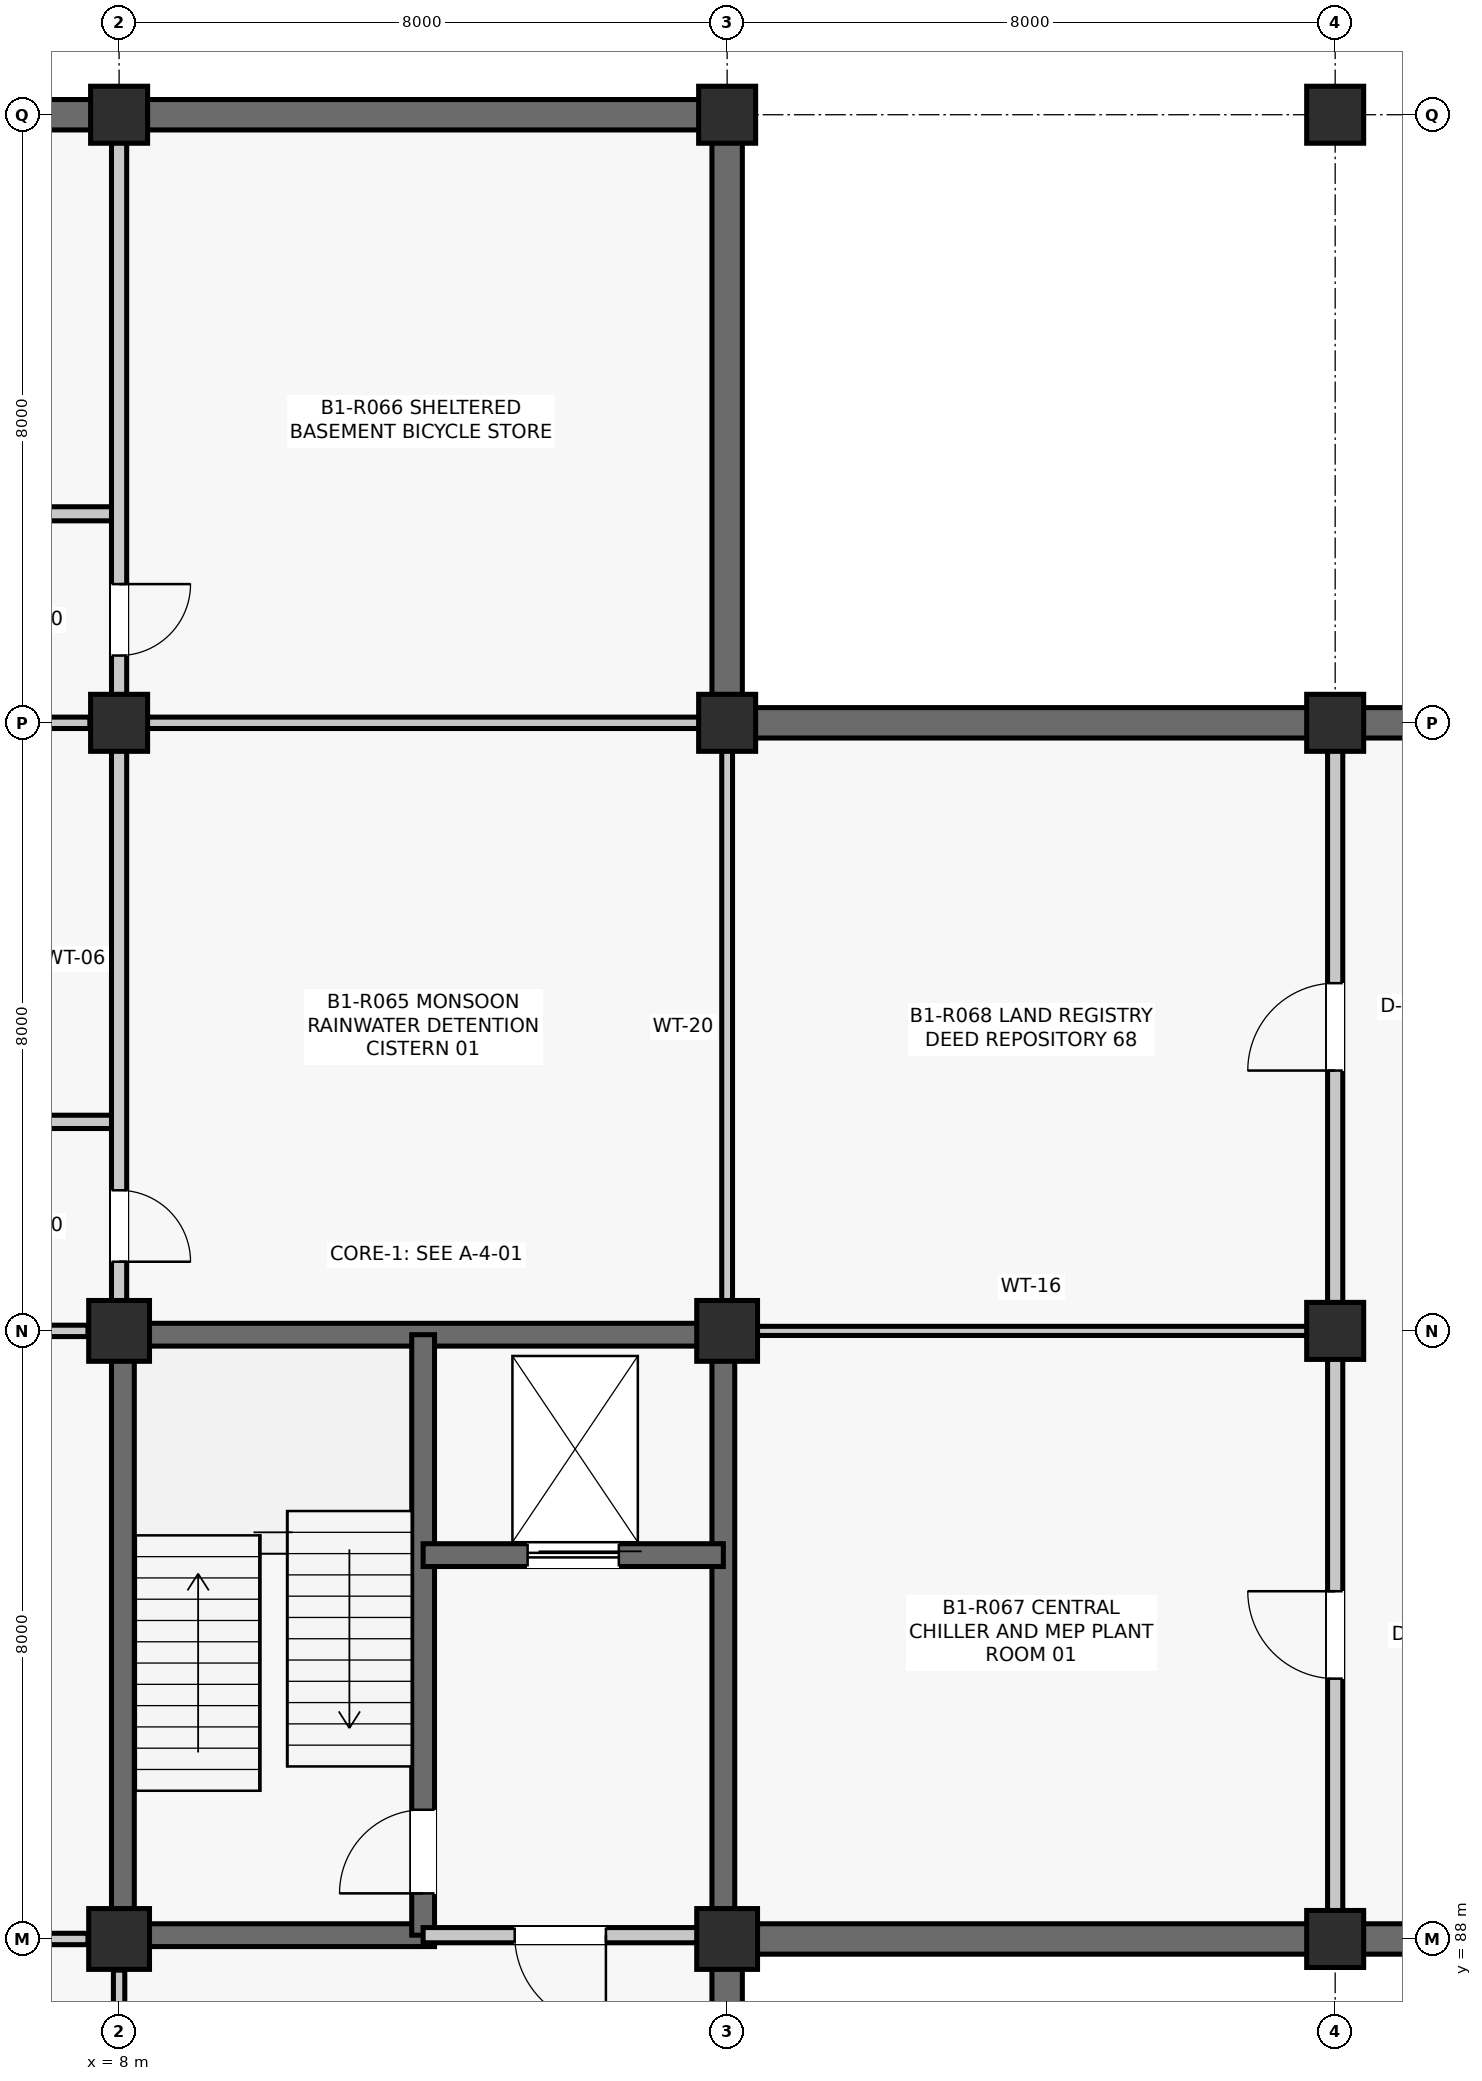
"""IFC4 building model, lengths in metres.
Left out: names, types, materials, properties, quantities, classifications, styles, units other than length and angle.
Written with IfcOpenShell. Run it as: python <this file> out.ifc"""

import sys

from ifc_helpers import new_model, si_unit, direction, frame, frame_2d, origin, origin_2d, place, context, subcontext, project, spatial, rectangle, extrude, element, fill, save


model = new_model("IFC4")
c1 = context("Model", 3, precision=1e-05, world=origin(), true_north=direction((0.0, 1.0)))
c2 = subcontext(c1, "Body", "Model", "MODEL_VIEW")
j1 = project(units=[si_unit("LENGTHUNIT", "METRE"), si_unit("PLANEANGLEUNIT", "RADIAN")], contexts=[c1])
p1 = place(None, origin())
s1 = spatial("IfcSite", under=j1, at=p1, CompositionType="ELEMENT")
p2 = place(p1, origin())
s2 = spatial("IfcBuilding", under=s1, at=p2, CompositionType="ELEMENT")
p3 = place(p2, frame((0.0, 0.0, -4.29)))
s3 = spatial("IfcBuildingStorey", under=s2, at=p3, CompositionType="ELEMENT", Elevation=-4.29)
for number, where, z_axis, x_axis in (
    (1, (8.0, 88.0, 0.0), (0.0, 0.0, 1.0), (1.0, 0.0, 0.0)),
    (2, (8.0, 96.0, 0.0), (0.0, 0.0, 1.0), (1.0, 0.0, 0.0)),
):
    element("IfcColumn", number, at=place(p3, frame(where, z_axis=z_axis, x_axis=x_axis)), inside=s3, PredefinedType="COLUMN", context=c2, shape_type="SweptSolid", body=[
        extrude(rectangle(XDim=0.8, YDim=0.8, at=origin_2d()), origin(), (0.0, 0.0, 1.0), 4.29),
    ])
for number, where, z_axis, x_axis in (
    (3, (8.0, 104.0, 0.0), (0.0, 0.0, 1.0), (1.0, 0.0, 0.0)),
    (4, (8.0, 112.0, 0.0), (0.0, 0.0, 1.0), (1.0, 0.0, 0.0)),
):
    element("IfcColumn", number, at=place(p3, frame(where, z_axis=z_axis, x_axis=x_axis)), inside=s3, PredefinedType="COLUMN", context=c2, shape_type="SweptSolid", body=[
        extrude(rectangle(XDim=0.75, YDim=0.75, at=origin_2d()), origin(), (0.0, 0.0, 1.0), 4.29),
    ])
for number, where, z_axis, x_axis in (
    (5, (16.0, 88.0, 0.0), (0.0, 0.0, 1.0), (1.0, 0.0, 0.0)),
    (6, (16.0, 96.0, 0.0), (0.0, 0.0, 1.0), (1.0, 0.0, 0.0)),
):
    element("IfcColumn", number, at=place(p3, frame(where, z_axis=z_axis, x_axis=x_axis)), inside=s3, PredefinedType="COLUMN", context=c2, shape_type="SweptSolid", body=[
        extrude(rectangle(XDim=0.8, YDim=0.8, at=origin_2d()), origin(), (0.0, 0.0, 1.0), 4.29),
    ])
for number, where, z_axis, x_axis in (
    (7, (16.0, 104.0, 0.0), (0.0, 0.0, 1.0), (1.0, 0.0, 0.0)),
    (8, (16.0, 112.0, 0.0), (0.0, 0.0, 1.0), (1.0, 0.0, 0.0)),
    (9, (24.0, 88.0, 0.0), (0.0, 0.0, 1.0), (1.0, 0.0, 0.0)),
    (10, (24.0, 96.0, 0.0), (0.0, 0.0, 1.0), (1.0, 0.0, 0.0)),
    (11, (24.0, 104.0, 0.0), (0.0, 0.0, 1.0), (1.0, 0.0, 0.0)),
    (12, (24.0, 112.0, 0.0), (0.0, 0.0, 1.0), (1.0, 0.0, 0.0)),
):
    element("IfcColumn", number, at=place(p3, frame(where, z_axis=z_axis, x_axis=x_axis)), inside=s3, PredefinedType="COLUMN", context=c2, shape_type="SweptSolid", body=[
        extrude(rectangle(XDim=0.75, YDim=0.75, at=origin_2d()), origin(), (0.0, 0.0, 1.0), 4.29),
    ])
p4 = place(p3, frame((0.36, 112.0, 0.0), z_axis=(0.0, 0.0, 1.0), x_axis=(1.0, 0.0, 0.0)))
e13 = element("IfcWall", 13, at=p4, inside=s3, PredefinedType="SHEAR", context=c2, shape_type="SweptSolid", body=[
    extrude(rectangle(XDim=7.28, YDim=0.4, at=frame_2d((3.64, 0.0))), origin(), (0.0, 0.0, 1.0), 3.654),
])
p5 = place(p3, frame((16.0, 80.335, 0.0), z_axis=(0.0, 0.0, 1.0), x_axis=(0.0, 1.0, 0.0)))
e14 = element("IfcWall", 14, at=p5, inside=s3, PredefinedType="SHEAR", context=c2, shape_type="SweptSolid", body=[
    extrude(rectangle(XDim=7.28, YDim=0.4, at=frame_2d((3.64, 0.0))), origin(), (0.0, 0.0, 1.0), 3.667),
])
p6 = place(p3, frame((8.36, 112.0, 0.0), z_axis=(0.0, 0.0, 1.0), x_axis=(1.0, 0.0, 0.0)))
e15 = element("IfcWall", 15, at=p6, inside=s3, PredefinedType="SHEAR", context=c2, shape_type="SweptSolid", body=[
    extrude(rectangle(XDim=7.28, YDim=0.4, at=frame_2d((3.64, 0.0))), origin(), (0.0, 0.0, 1.0), 3.594),
])
p7 = place(p3, frame((16.0, 104.36, 0.0), z_axis=(0.0, 0.0, 1.0), x_axis=(0.0, 1.0, 0.0)))
e16 = element("IfcWall", 16, at=p7, inside=s3, PredefinedType="SHEAR", context=c2, shape_type="SweptSolid", body=[
    extrude(rectangle(XDim=7.28, YDim=0.4, at=frame_2d((3.64, 0.0))), origin(), (0.0, 0.0, 1.0), 3.458),
])
p8 = place(p3, frame((16.385, 88.0, 0.0), z_axis=(0.0, 0.0, 1.0), x_axis=(1.0, 0.0, 0.0)))
e17 = element("IfcWall", 17, at=p8, inside=s3, PredefinedType="SHEAR", context=c2, shape_type="SweptSolid", body=[
    extrude(rectangle(XDim=7.255, YDim=0.4, at=frame_2d((3.627, 0.0))), origin(), (0.0, 0.0, 1.0), 3.59),
])
p9 = place(p3, frame((16.36, 104.0, 0.0), z_axis=(0.0, 0.0, 1.0), x_axis=(1.0, 0.0, 0.0)))
e18 = element("IfcWall", 18, at=p9, inside=s3, PredefinedType="SHEAR", context=c2, shape_type="SweptSolid", body=[
    extrude(rectangle(XDim=7.28, YDim=0.4, at=frame_2d((3.64, 0.0))), origin(), (0.0, 0.0, 1.0), 3.391),
])
p10 = place(p3, frame((24.36, 88.0, 0.0), z_axis=(0.0, 0.0, 1.0), x_axis=(1.0, 0.0, 0.0)))
e19 = element("IfcWall", 19, at=p10, inside=s3, PredefinedType="SHEAR", context=c2, shape_type="SweptSolid", body=[
    extrude(rectangle(XDim=7.28, YDim=0.4, at=frame_2d((3.64, 0.0))), origin(), (0.0, 0.0, 1.0), 3.654),
])
p11 = place(p3, frame((24.36, 104.0, 0.0), z_axis=(0.0, 0.0, 1.0), x_axis=(1.0, 0.0, 0.0)))
e20 = element("IfcWall", 20, at=p11, inside=s3, PredefinedType="SHEAR", context=c2, shape_type="SweptSolid", body=[
    extrude(rectangle(XDim=7.255, YDim=0.4, at=frame_2d((3.627, 0.0))), origin(), (0.0, 0.0, 1.0), 3.314),
])
for number, where, z_axis, x_axis in (
    (21, (8.05, 88.29, 0.0), (0.0, 0.0, 1.0), (0.0, 1.0, 0.0)),
    (22, (8.29, 95.95, 0.0), (0.0, 0.0, 1.0), (1.0, 0.0, 0.0)),
    (23, (15.95, 88.29, 0.0), (0.0, 0.0, 1.0), (0.0, 1.0, 0.0)),
):
    element("IfcWall", number, at=place(p3, frame(where, z_axis=z_axis, x_axis=x_axis)), inside=s3, PredefinedType="SHEAR", context=c2, shape_type="SweptSolid", body=[
        extrude(rectangle(XDim=7.42, YDim=0.3, at=frame_2d((3.71, 0.0))), origin(), (0.0, 0.0, 1.0), 4.015),
    ])
p12 = place(p3, frame((8.29, 88.05, 0.0), z_axis=(0.0, 0.0, 1.0), x_axis=(1.0, 0.0, 0.0)))
e24 = element("IfcWall", 24, at=p12, inside=s3, PredefinedType="SHEAR", context=c2, shape_type="SweptSolid", body=[
    extrude(rectangle(XDim=3.86, YDim=0.3, at=frame_2d((1.93, 0.0))), origin(), (0.0, 0.0, 1.0), 4.015),
])
p13 = place(p3, frame((12.0, 88.05, 0.0), z_axis=(0.0, 0.0, 1.0), x_axis=(0.0, 1.0, 0.0)))
e25 = element("IfcWall", 25, at=p13, inside=s3, PredefinedType="SHEAR", context=c2, shape_type="SweptSolid", body=[
    extrude(rectangle(XDim=7.9, YDim=0.3, at=frame_2d((3.95, 0.0))), origin(), (0.0, 0.0, 1.0), 4.015),
])
p14 = place(p13, frame((0.55, 0.0, 0.0)))
e26 = element("IfcOpeningElement", 26, at=p14, cuts=e25, PredefinedType="OPENING", context=c2, shape_type="SweptSolid", body=[
    extrude(rectangle(XDim=1.1, YDim=2.15, at=frame_2d((0.55, 1.075))), frame((0.0, 0.16, 0.0), z_axis=(0.0, -1.0, 0.0), x_axis=(1.0, 0.0, 0.0)), (0.0, 0.0, 1.0), 0.32),
])
p15 = place(p3, frame((12.0, 93.05, 0.0), z_axis=(0.0, 0.0, 1.0), x_axis=(1.0, 0.0, 0.0)))
e27 = element("IfcWall", 27, at=p15, inside=s3, PredefinedType="SHEAR", context=c2, shape_type="SweptSolid", body=[
    extrude(rectangle(XDim=3.95, YDim=0.3, at=frame_2d((1.975, 0.0))), origin(), (0.0, 0.0, 1.0), 4.015),
])
p16 = place(p15, frame((1.375, 0.0, 0.0)))
e28 = element("IfcOpeningElement", 28, at=p16, cuts=e27, PredefinedType="OPENING", context=c2, shape_type="SweptSolid", body=[
    extrude(rectangle(XDim=1.2, YDim=2.2, at=frame_2d((0.6, 1.1))), frame((0.0, 0.16, 0.0), z_axis=(0.0, -1.0, 0.0), x_axis=(1.0, 0.0, 0.0)), (0.0, 0.0, 1.0), 0.32),
])
p17 = place(p3, frame((12.0, 88.05, 0.0), z_axis=(0.0, 0.0, 1.0), x_axis=(1.0, 0.0, 0.0)))
e29 = element("IfcWall", 29, at=p17, inside=s3, PredefinedType="PARTITIONING", context=c2, shape_type="SweptSolid", body=[
    extrude(rectangle(XDim=3.61, YDim=0.2, at=frame_2d((1.805, 0.0))), origin(), (0.0, 0.0, 1.0), 3.307),
])
p18 = place(p17, frame((1.205, 0.0, 0.0)))
e30 = element("IfcOpeningElement", 30, at=p18, cuts=e29, PredefinedType="OPENING", context=c2, shape_type="SweptSolid", body=[
    extrude(rectangle(XDim=1.2, YDim=2.15, at=frame_2d((0.6, 1.075))), frame((0.0, 0.11, 0.0), z_axis=(0.0, -1.0, 0.0), x_axis=(1.0, 0.0, 0.0)), (0.0, 0.0, 1.0), 0.22),
])
p19 = place(p3, frame((2.75, 88.0, 0.0), z_axis=(0.0, 0.0, 1.0), x_axis=(1.0, 0.0, 0.0)))
e31 = element("IfcWall", 31, at=p19, inside=s3, PredefinedType="PARTITIONING", context=c2, shape_type="SweptSolid", body=[
    extrude(rectangle(XDim=4.84, YDim=0.15, at=frame_2d((2.42, 0.0))), origin(), (0.0, 0.0, 1.0), 3.384),
])
p20 = place(p3, frame((8.0, 82.75, 0.0), z_axis=(0.0, 0.0, 1.0), x_axis=(0.0, 1.0, 0.0)))
e32 = element("IfcWall", 32, at=p20, inside=s3, PredefinedType="PARTITIONING", context=c2, shape_type="SweptSolid", body=[
    extrude(rectangle(XDim=4.84, YDim=0.15, at=frame_2d((2.42, 0.0))), origin(), (0.0, 0.0, 1.0), 3.461),
])
p21 = place(p3, frame((2.75, 96.0, 0.0), z_axis=(0.0, 0.0, 1.0), x_axis=(1.0, 0.0, 0.0)))
e33 = element("IfcWall", 33, at=p21, inside=s3, PredefinedType="PARTITIONING", context=c2, shape_type="SweptSolid", body=[
    extrude(rectangle(XDim=4.84, YDim=0.15, at=frame_2d((2.42, 0.0))), origin(), (0.0, 0.0, 1.0), 3.307),
])
p22 = place(p3, frame((2.7, 98.75, 0.0), z_axis=(0.0, 0.0, 1.0), x_axis=(1.0, 0.0, 0.0)))
e34 = element("IfcWall", 34, at=p22, inside=s3, PredefinedType="PARTITIONING", context=c2, shape_type="SweptSolid", body=[
    extrude(rectangle(XDim=5.28, YDim=0.175, at=frame_2d((2.64, 0.0))), origin(), (0.0, 0.0, 1.0), 3.392),
])
p23 = place(p22, frame((2.13, 0.0, 0.0)))
e35 = element("IfcOpeningElement", 35, at=p23, cuts=e34, PredefinedType="OPENING", context=c2, shape_type="SweptSolid", body=[
    extrude(rectangle(XDim=1.02, YDim=2.2, at=frame_2d((0.51, 1.1))), frame((0.0, 0.097, 0.0), z_axis=(0.0, -1.0, 0.0), x_axis=(1.0, 0.0, 0.0)), (0.0, 0.0, 1.0), 0.195),
])
p24 = place(p3, frame((2.75, 104.0, 0.0), z_axis=(0.0, 0.0, 1.0), x_axis=(1.0, 0.0, 0.0)))
e36 = element("IfcWall", 36, at=p24, inside=s3, PredefinedType="PARTITIONING", context=c2, shape_type="SweptSolid", body=[
    extrude(rectangle(XDim=4.865, YDim=0.15, at=frame_2d((2.433, 0.0))), origin(), (0.0, 0.0, 1.0), 3.383),
])
p25 = place(p3, frame((2.7, 106.75, 0.0), z_axis=(0.0, 0.0, 1.0), x_axis=(1.0, 0.0, 0.0)))
e37 = element("IfcWall", 37, at=p25, inside=s3, PredefinedType="PARTITIONING", context=c2, shape_type="SweptSolid", body=[
    extrude(rectangle(XDim=5.28, YDim=0.185, at=frame_2d((2.64, 0.0))), origin(), (0.0, 0.0, 1.0), 3.384),
])
p26 = place(p25, frame((2.1, 0.0, 0.0)))
e38 = element("IfcOpeningElement", 38, at=p26, cuts=e37, PredefinedType="OPENING", context=c2, shape_type="SweptSolid", body=[
    extrude(rectangle(XDim=1.08, YDim=2.2, at=frame_2d((0.54, 1.1))), frame((0.0, 0.103, 0.0), z_axis=(0.0, -1.0, 0.0), x_axis=(1.0, 0.0, 0.0)), (0.0, 0.0, 1.0), 0.205),
])
p27 = place(p3, frame((8.0, 96.39, 0.0), z_axis=(0.0, 0.0, 1.0), x_axis=(0.0, 1.0, 0.0)))
e39 = element("IfcWall", 39, at=p27, inside=s3, PredefinedType="PARTITIONING", context=c2, shape_type="SweptSolid", body=[
    extrude(rectangle(XDim=7.245, YDim=0.2, at=frame_2d((3.623, 0.0))), origin(), (0.0, 0.0, 1.0), 3.392),
])
p28 = place(p27, frame((0.52, 0.0, 0.0)))
e40 = element("IfcOpeningElement", 40, at=p28, cuts=e39, PredefinedType="OPENING", context=c2, shape_type="SweptSolid", body=[
    extrude(rectangle(XDim=0.94, YDim=2.12, at=frame_2d((0.47, 1.06))), frame((0.0, 0.11, 0.0), z_axis=(0.0, -1.0, 0.0), x_axis=(1.0, 0.0, 0.0)), (0.0, 0.0, 1.0), 0.22),
])
p29 = place(p3, frame((8.0, 104.365, 0.0), z_axis=(0.0, 0.0, 1.0), x_axis=(0.0, 1.0, 0.0)))
e41 = element("IfcWall", 41, at=p29, inside=s3, PredefinedType="PARTITIONING", context=c2, shape_type="SweptSolid", body=[
    extrude(rectangle(XDim=7.27, YDim=0.2, at=frame_2d((3.635, 0.0))), origin(), (0.0, 0.0, 1.0), 3.384),
])
p30 = place(p29, frame((0.52, 0.0, 0.0)))
e42 = element("IfcOpeningElement", 42, at=p30, cuts=e41, PredefinedType="OPENING", context=c2, shape_type="SweptSolid", body=[
    extrude(rectangle(XDim=0.94, YDim=2.12, at=frame_2d((0.47, 1.06))), frame((0.0, 0.11, 0.0), z_axis=(0.0, -1.0, 0.0), x_axis=(1.0, 0.0, 0.0)), (0.0, 0.0, 1.0), 0.22),
])
p31 = place(p3, frame((16.0, 96.39, 0.0), z_axis=(0.0, 0.0, 1.0), x_axis=(0.0, 1.0, 0.0)))
e43 = element("IfcWall", 43, at=p31, inside=s3, PredefinedType="PARTITIONING", context=c2, shape_type="SweptSolid", body=[
    extrude(rectangle(XDim=7.245, YDim=0.142, at=frame_2d((3.623, 0.0))), origin(), (0.0, 0.0, 1.0), 3.384),
])
p32 = place(p3, frame((8.365, 104.0, 0.0), z_axis=(0.0, 0.0, 1.0), x_axis=(1.0, 0.0, 0.0)))
e44 = element("IfcWall", 44, at=p32, inside=s3, PredefinedType="PARTITIONING", context=c2, shape_type="SweptSolid", body=[
    extrude(rectangle(XDim=7.27, YDim=0.15, at=frame_2d((3.635, 0.0))), origin(), (0.0, 0.0, 1.0), 3.316),
])
p33 = place(p3, frame((24.0, 88.365, 0.0), z_axis=(0.0, 0.0, 1.0), x_axis=(0.0, 1.0, 0.0)))
e45 = element("IfcWall", 45, at=p33, inside=s3, PredefinedType="PARTITIONING", context=c2, shape_type="SweptSolid", body=[
    extrude(rectangle(XDim=7.27, YDim=0.2, at=frame_2d((3.635, 0.0))), origin(), (0.0, 0.0, 1.0), 3.384),
])
p34 = place(p33, frame((3.06, 0.0, 0.0)))
e46 = element("IfcOpeningElement", 46, at=p34, cuts=e45, PredefinedType="OPENING", context=c2, shape_type="SweptSolid", body=[
    extrude(rectangle(XDim=1.15, YDim=2.15, at=frame_2d((0.575, 1.075))), frame((0.0, 0.11, 0.0), z_axis=(0.0, -1.0, 0.0), x_axis=(1.0, 0.0, 0.0)), (0.0, 0.0, 1.0), 0.22),
])
p35 = place(p3, frame((16.39, 96.0, 0.0), z_axis=(0.0, 0.0, 1.0), x_axis=(1.0, 0.0, 0.0)))
e47 = element("IfcWall", 47, at=p35, inside=s3, PredefinedType="PARTITIONING", context=c2, shape_type="SweptSolid", body=[
    extrude(rectangle(XDim=7.245, YDim=0.12, at=frame_2d((3.623, 0.0))), origin(), (0.0, 0.0, 1.0), 3.316),
])
p36 = place(p3, frame((24.0, 96.365, 0.0), z_axis=(0.0, 0.0, 1.0), x_axis=(0.0, 1.0, 0.0)))
e48 = element("IfcWall", 48, at=p36, inside=s3, PredefinedType="PARTITIONING", context=c2, shape_type="SweptSolid", body=[
    extrude(rectangle(XDim=7.27, YDim=0.2, at=frame_2d((3.635, 0.0))), origin(), (0.0, 0.0, 1.0), 3.451),
])
p37 = place(p36, frame((3.06, 0.0, 0.0)))
e49 = element("IfcOpeningElement", 49, at=p37, cuts=e48, PredefinedType="OPENING", context=c2, shape_type="SweptSolid", body=[
    extrude(rectangle(XDim=1.15, YDim=2.15, at=frame_2d((0.575, 1.075))), frame((0.0, 0.11, 0.0), z_axis=(0.0, -1.0, 0.0), x_axis=(1.0, 0.0, 0.0)), (0.0, 0.0, 1.0), 0.22),
])
p38 = place(p14, origin())
e50 = element("IfcDoor", 50, at=p38, inside=s3, OperationType="SINGLE_SWING_LEFT", PredefinedType="DOOR", context=c2, shape_type="SweptSolid", body=[
    extrude(rectangle(XDim=1.1, YDim=2.15, at=frame_2d((0.55, 1.075))), frame((0.0, 0.025, 0.0), z_axis=(0.0, -1.0, 0.0), x_axis=(1.0, 0.0, 0.0)), (0.0, 0.0, 1.0), 0.05),
])
fill(e26, e50)
p39 = place(p16, origin())
e51 = element("IfcDoor", 51, at=p39, inside=s3, OperationType="SLIDING_TO_LEFT", PredefinedType="DOOR", context=c2, shape_type="SweptSolid", body=[
    extrude(rectangle(XDim=1.2, YDim=2.2, at=frame_2d((0.6, 1.1))), frame((0.0, 0.025, 0.0), z_axis=(0.0, -1.0, 0.0), x_axis=(1.0, 0.0, 0.0)), (0.0, 0.0, 1.0), 0.05),
])
fill(e28, e51)
p40 = place(p18, frame((1.2, 0.0, 0.0), z_axis=(0.0, 0.0, 1.0), x_axis=(-1.0, 0.0, 0.0)))
e52 = element("IfcDoor", 52, at=p40, inside=s3, OperationType="SINGLE_SWING_RIGHT", PredefinedType="DOOR", context=c2, shape_type="SweptSolid", body=[
    extrude(rectangle(XDim=1.2, YDim=2.15, at=frame_2d((0.6, 1.075))), frame((0.0, 0.025, 0.0), z_axis=(0.0, -1.0, 0.0), x_axis=(1.0, 0.0, 0.0)), (0.0, 0.0, 1.0), 0.05),
])
fill(e30, e52)
p41 = place(p28, frame((0.94, 0.0, 0.0), z_axis=(0.0, 0.0, 1.0), x_axis=(-1.0, 0.0, 0.0)))
e53 = element("IfcDoor", 53, at=p41, inside=s3, OperationType="SINGLE_SWING_LEFT", PredefinedType="DOOR", context=c2, shape_type="SweptSolid", body=[
    extrude(rectangle(XDim=0.94, YDim=2.12, at=frame_2d((0.47, 1.06))), frame((0.0, 0.025, 0.0), z_axis=(0.0, -1.0, 0.0), x_axis=(1.0, 0.0, 0.0)), (0.0, 0.0, 1.0), 0.05),
])
fill(e40, e53)
p42 = place(p30, frame((0.94, 0.0, 0.0), z_axis=(0.0, 0.0, 1.0), x_axis=(-1.0, 0.0, 0.0)))
e54 = element("IfcDoor", 54, at=p42, inside=s3, OperationType="SINGLE_SWING_RIGHT", PredefinedType="DOOR", context=c2, shape_type="SweptSolid", body=[
    extrude(rectangle(XDim=0.94, YDim=2.12, at=frame_2d((0.47, 1.06))), frame((0.0, 0.025, 0.0), z_axis=(0.0, -1.0, 0.0), x_axis=(1.0, 0.0, 0.0)), (0.0, 0.0, 1.0), 0.05),
])
fill(e42, e54)
p43 = place(p34, origin())
e55 = element("IfcDoor", 55, at=p43, inside=s3, OperationType="SINGLE_SWING_RIGHT", PredefinedType="DOOR", context=c2, shape_type="SweptSolid", body=[
    extrude(rectangle(XDim=1.15, YDim=2.15, at=frame_2d((0.575, 1.075))), frame((0.0, 0.025, 0.0), z_axis=(0.0, -1.0, 0.0), x_axis=(1.0, 0.0, 0.0)), (0.0, 0.0, 1.0), 0.05),
])
fill(e46, e55)
p44 = place(p37, origin())
e56 = element("IfcDoor", 56, at=p44, inside=s3, OperationType="SINGLE_SWING_LEFT", PredefinedType="DOOR", context=c2, shape_type="SweptSolid", body=[
    extrude(rectangle(XDim=1.15, YDim=2.15, at=frame_2d((0.575, 1.075))), frame((0.0, 0.025, 0.0), z_axis=(0.0, -1.0, 0.0), x_axis=(1.0, 0.0, 0.0)), (0.0, 0.0, 1.0), 0.05),
])
fill(e49, e56)
save(model, sys.argv[1])
